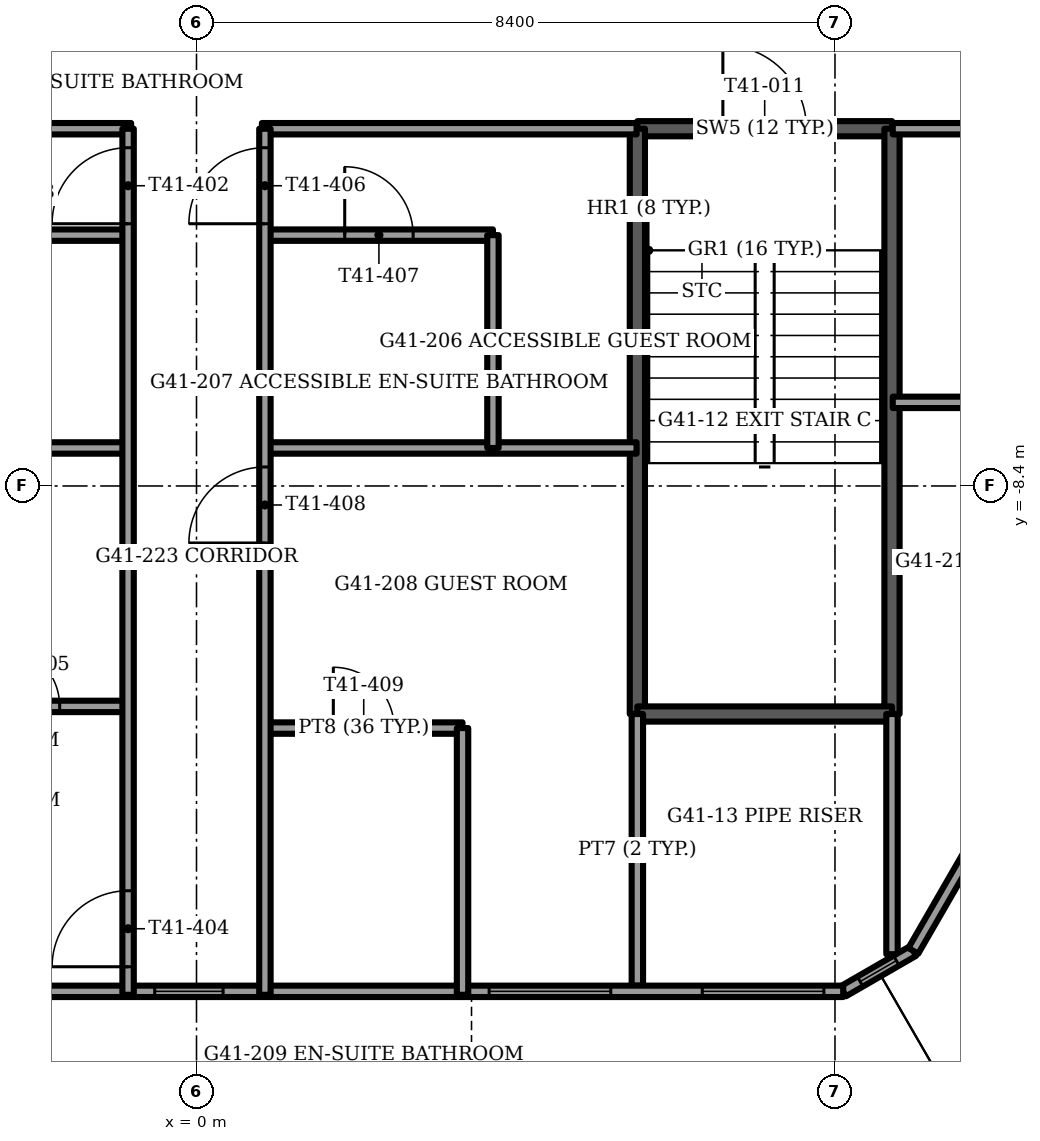
"""IFC4 building model, lengths in metres.
Left out: names, types, materials, properties, quantities, classifications, styles, units other than length and angle.
Written with IfcOpenShell. Run it as: python <this file> out.ifc"""

import sys

from ifc_helpers import new_model, si_unit, direction, frame, frame_2d, origin, place, context, subcontext, project, spatial, rectangle, extrude, element, fill, save


model = new_model("IFC4")
c1 = context("Model", 3, precision=1e-05, world=origin(), true_north=direction((0.0, 1.0)))
c2 = subcontext(c1, "Body", "Model", "MODEL_VIEW")
j1 = project(units=[si_unit("LENGTHUNIT", "METRE"), si_unit("PLANEANGLEUNIT", "RADIAN")], contexts=[c1])
p1 = place(None, origin())
s1 = spatial("IfcSite", under=j1, at=p1, CompositionType="ELEMENT")
p2 = place(p1, origin())
s2 = spatial("IfcBuilding", under=s1, at=p2, CompositionType="ELEMENT")
p3 = place(p2, frame((0.0, 0.0, 168.25)))
s3 = spatial("IfcBuildingStorey", under=s2, at=p3, CompositionType="ELEMENT", Elevation=168.25)
p4 = place(p3, frame((-8.508, -15.049, 0.0), z_axis=(0.0, 0.0, 1.0), x_axis=(1.0, 0.0, 0.0)))
e1 = element("IfcWall", 1, at=p4, inside=s3, PredefinedType="SOLIDWALL", context=c2, shape_type="SweptSolid", body=[
    extrude(rectangle(XDim=17.016, YDim=0.15, at=frame_2d((8.508, 0.0))), origin(), (0.0, 0.0, 1.0), 3.45),
])
p5 = place(p4, frame((3.058, 0.0, 0.15)))
e2 = element("IfcOpeningElement", 2, at=p5, cuts=e1, PredefinedType="OPENING", context=c2, shape_type="SweptSolid", body=[
    extrude(rectangle(XDim=1.6, YDim=2.85, at=frame_2d((0.8, 1.425))), frame((0.0, 0.075, 0.0), z_axis=(0.0, -1.0, 0.0), x_axis=(1.0, 0.0, 0.0)), (0.0, 0.0, 1.0), 0.15),
])
p6 = place(p4, frame((4.708, 0.0, 0.0)))
e3 = element("IfcOpeningElement", 3, at=p6, cuts=e1, PredefinedType="OPENING", context=c2, shape_type="SweptSolid", body=[
    extrude(rectangle(XDim=1.4, YDim=2.4, at=frame_2d((0.7, 1.2))), frame((0.0, 0.075, 0.0), z_axis=(0.0, -1.0, 0.0), x_axis=(1.0, 0.0, 0.0)), (0.0, 0.0, 1.0), 0.15),
])
p7 = place(p4, frame((7.958, 0.0, 0.15)))
e4 = element("IfcOpeningElement", 4, at=p7, cuts=e1, PredefinedType="OPENING", context=c2, shape_type="SweptSolid", body=[
    extrude(rectangle(XDim=0.9, YDim=2.85, at=frame_2d((0.45, 1.425))), frame((0.0, 0.075, 0.0), z_axis=(0.0, -1.0, 0.0), x_axis=(1.0, 0.0, 0.0)), (0.0, 0.0, 1.0), 0.15),
])
p8 = place(p4, frame((12.358, 0.0, 0.15)))
e5 = element("IfcOpeningElement", 5, at=p8, cuts=e1, PredefinedType="OPENING", context=c2, shape_type="SweptSolid", body=[
    extrude(rectangle(XDim=1.6, YDim=2.85, at=frame_2d((0.8, 1.425))), frame((0.0, 0.075, 0.0), z_axis=(0.0, -1.0, 0.0), x_axis=(1.0, 0.0, 0.0)), (0.0, 0.0, 1.0), 0.15),
])
p9 = place(p4, frame((0.254, 0.0, 0.15)))
e6 = element("IfcOpeningElement", 6, at=p9, cuts=e1, PredefinedType="OPENING", context=c2, shape_type="SweptSolid", body=[
    extrude(rectangle(XDim=1.6, YDim=2.73, at=frame_2d((0.8, 1.365))), frame((0.0, 0.075, 0.0), z_axis=(0.0, -1.0, 0.0), x_axis=(1.0, 0.0, 0.0)), (0.0, 0.0, 1.0), 0.15),
])
p10 = place(p4, frame((15.162, 0.0, 0.15)))
e7 = element("IfcOpeningElement", 7, at=p10, cuts=e1, PredefinedType="OPENING", context=c2, shape_type="SweptSolid", body=[
    extrude(rectangle(XDim=1.6, YDim=2.73, at=frame_2d((0.8, 1.365))), frame((0.0, 0.075, 0.0), z_axis=(0.0, -1.0, 0.0), x_axis=(1.0, 0.0, 0.0)), (0.0, 0.0, 1.0), 0.15),
])
p11 = place(p3, frame((9.43, -14.516, 0.0), z_axis=(0.0, 0.0, 1.0), x_axis=(0.500004460396, 0.866022828558, 0.0)))
e8 = element("IfcWall", 8, at=p11, inside=s3, PredefinedType="SOLIDWALL", context=c2, shape_type="SweptSolid", body=[
    extrude(rectangle(XDim=15.712, YDim=0.15, at=frame_2d((7.856, 0.0))), origin(), (0.0, 0.0, 1.0), 3.45),
])
p12 = place(p11, frame((1.856, 0.0, 0.15)))
e9 = element("IfcOpeningElement", 9, at=p12, cuts=e8, PredefinedType="OPENING", context=c2, shape_type="SweptSolid", body=[
    extrude(rectangle(XDim=1.6, YDim=2.85, at=frame_2d((0.8, 1.425))), frame((0.0, 0.075, 0.0), z_axis=(0.0, -1.0, 0.0), x_axis=(1.0, 0.0, 0.0)), (0.0, 0.0, 1.0), 0.15),
])
p13 = place(p11, frame((4.056, 0.0, 0.0)))
e10 = element("IfcOpeningElement", 10, at=p13, cuts=e8, PredefinedType="OPENING", context=c2, shape_type="SweptSolid", body=[
    extrude(rectangle(XDim=1.4, YDim=2.4, at=frame_2d((0.7, 1.2))), frame((0.0, 0.075, 0.0), z_axis=(0.0, -1.0, 0.0), x_axis=(1.0, 0.0, 0.0)), (0.0, 0.0, 1.0), 0.15),
])
p14 = place(p11, frame((6.056, 0.0, 0.15)))
e11 = element("IfcOpeningElement", 11, at=p14, cuts=e8, PredefinedType="OPENING", context=c2, shape_type="SweptSolid", body=[
    extrude(rectangle(XDim=1.6, YDim=2.85, at=frame_2d((0.8, 1.425))), frame((0.0, 0.075, 0.0), z_axis=(0.0, -1.0, 0.0), x_axis=(1.0, 0.0, 0.0)), (0.0, 0.0, 1.0), 0.15),
])
p15 = place(p11, frame((8.256, 0.0, 0.0)))
e12 = element("IfcOpeningElement", 12, at=p15, cuts=e8, PredefinedType="OPENING", context=c2, shape_type="SweptSolid", body=[
    extrude(rectangle(XDim=1.4, YDim=2.4, at=frame_2d((0.7, 1.2))), frame((0.0, 0.075, 0.0), z_axis=(0.0, -1.0, 0.0), x_axis=(1.0, 0.0, 0.0)), (0.0, 0.0, 1.0), 0.15),
])
p16 = place(p11, frame((10.256, 0.0, 0.15)))
e13 = element("IfcOpeningElement", 13, at=p16, cuts=e8, PredefinedType="OPENING", context=c2, shape_type="SweptSolid", body=[
    extrude(rectangle(XDim=1.6, YDim=2.85, at=frame_2d((0.8, 1.425))), frame((0.0, 0.075, 0.0), z_axis=(0.0, -1.0, 0.0), x_axis=(1.0, 0.0, 0.0)), (0.0, 0.0, 1.0), 0.15),
])
p17 = place(p3, frame((8.508, -15.049, 0.0), z_axis=(0.0, 0.0, 1.0), x_axis=(0.866048165231, 0.499960573946, 0.0)))
e14 = element("IfcWall", 14, at=p17, inside=s3, PredefinedType="SOLIDWALL", context=c2, shape_type="SweptSolid", body=[
    extrude(rectangle(XDim=1.065, YDim=0.15, at=frame_2d((0.532, 0.0))), origin(), (0.0, 0.0, 1.0), 3.45),
])
p18 = place(p17, frame((0.258, 0.0, 0.15)))
e15 = element("IfcOpeningElement", 15, at=p18, cuts=e14, PredefinedType="OPENING", context=c2, shape_type="SweptSolid", body=[
    extrude(rectangle(XDim=0.55, YDim=2.85, at=frame_2d((0.275, 1.425))), frame((0.0, 0.075, 0.0), z_axis=(0.0, -1.0, 0.0), x_axis=(1.0, 0.0, 0.0)), (0.0, 0.0, 1.0), 0.15),
])
p19 = place(p3, frame((5.8, -3.7, -0.3), z_axis=(0.0, 0.0, 1.0), x_axis=(1.0, 0.0, 0.0)))
e16 = element("IfcWall", 16, at=p19, inside=s3, PredefinedType="SOLIDWALL", context=c2, shape_type="SweptSolid", body=[
    extrude(rectangle(XDim=3.35, YDim=0.2, at=frame_2d((1.675, 0.0))), origin(), (0.0, 0.0, 1.0), 3.75),
])
p20 = place(p19, frame((1.125, 0.0, 0.0)))
e17 = element("IfcOpeningElement", 17, at=p20, cuts=e16, PredefinedType="OPENING", context=c2, shape_type="SweptSolid", body=[
    extrude(rectangle(XDim=1.1, YDim=2.1, at=frame_2d((0.55, 1.05))), frame((0.0, 0.1, 0.0), z_axis=(0.0, -1.0, 0.0), x_axis=(1.0, 0.0, 0.0)), (0.0, 0.0, 1.0), 0.2),
])
for number, where, z_axis, x_axis in (
    (18, (5.8, -3.7, -0.3), (0.0, 0.0, 1.0), (0.0, -1.0, 0.0)),
    (19, (9.15, -3.7, -0.3), (0.0, 0.0, 1.0), (0.0, -1.0, 0.0)),
):
    element("IfcWall", number, at=place(p3, frame(where, z_axis=z_axis, x_axis=x_axis)), inside=s3, PredefinedType="SOLIDWALL", context=c2, shape_type="SweptSolid", body=[
        extrude(rectangle(XDim=7.7, YDim=0.2, at=frame_2d((3.85, 0.0))), origin(), (0.0, 0.0, 1.0), 3.75),
    ])
p21 = place(p3, frame((5.8, -11.4, -0.3), z_axis=(0.0, 0.0, 1.0), x_axis=(1.0, 0.0, 0.0)))
e20 = element("IfcWall", 20, at=p21, inside=s3, PredefinedType="SOLIDWALL", context=c2, shape_type="SweptSolid", body=[
    extrude(rectangle(XDim=3.35, YDim=0.2, at=frame_2d((1.675, 0.0))), origin(), (0.0, 0.0, 1.0), 3.75),
])
p22 = place(p3, frame((5.8, -11.4, 0.0), z_axis=(0.0, 0.0, 1.0), x_axis=(0.0, -1.0, 0.0)))
e21 = element("IfcWall", 21, at=p22, inside=s3, PredefinedType="PARTITIONING", context=c2, shape_type="SweptSolid", body=[
    extrude(rectangle(XDim=3.574, YDim=0.15, at=frame_2d((1.787, 0.0))), origin(), (0.0, 0.0, 1.0), 3.45),
])
p23 = place(p3, frame((9.15, -11.4, 0.0), z_axis=(0.0, 0.0, 1.0), x_axis=(0.0, -1.0, 0.0)))
e22 = element("IfcWall", 22, at=p23, inside=s3, PredefinedType="PARTITIONING", context=c2, shape_type="SweptSolid", body=[
    extrude(rectangle(XDim=3.16, YDim=0.15, at=frame_2d((1.58, 0.0))), origin(), (0.0, 0.0, 1.0), 3.45),
])
p24 = place(p3, frame((0.9, -11.585, 0.0), z_axis=(0.0, 0.0, 1.0), x_axis=(1.0, 0.0, 0.0)))
e23 = element("IfcWall", 23, at=p24, inside=s3, PredefinedType="PARTITIONING", context=c2, shape_type="SweptSolid", body=[
    extrude(rectangle(XDim=2.6, YDim=0.15, at=frame_2d((1.3, 0.0))), origin(), (0.0, 0.0, 1.0), 3.45),
])
p25 = place(p24, frame((0.9, 0.0, 0.0)))
e24 = element("IfcOpeningElement", 24, at=p25, cuts=e23, PredefinedType="OPENING", context=c2, shape_type="SweptSolid", body=[
    extrude(rectangle(XDim=0.8, YDim=2.1, at=frame_2d((0.4, 1.05))), frame((0.0, 0.075, 0.0), z_axis=(0.0, -1.0, 0.0), x_axis=(1.0, 0.0, 0.0)), (0.0, 0.0, 1.0), 0.15),
])
p26 = place(p3, frame((-3.5, -11.3, 0.0), z_axis=(0.0, 0.0, 1.0), x_axis=(1.0, 0.0, 0.0)))
e25 = element("IfcWall", 25, at=p26, inside=s3, PredefinedType="PARTITIONING", context=c2, shape_type="SweptSolid", body=[
    extrude(rectangle(XDim=2.6, YDim=0.15, at=frame_2d((1.3, 0.0))), origin(), (0.0, 0.0, 1.0), 3.45),
])
p27 = place(p26, frame((0.9, 0.0, 0.0)))
e26 = element("IfcOpeningElement", 26, at=p27, cuts=e25, PredefinedType="OPENING", context=c2, shape_type="SweptSolid", body=[
    extrude(rectangle(XDim=0.8, YDim=2.1, at=frame_2d((0.4, 1.05))), frame((0.0, 0.075, 0.0), z_axis=(0.0, -1.0, 0.0), x_axis=(1.0, 0.0, 0.0)), (0.0, 0.0, 1.0), 0.15),
])
for number, where, z_axis, x_axis in (
    (27, (-5.79, -7.9, 0.0), (0.0, 0.0, 1.0), (1.0, 0.0, 0.0)),
    (28, (0.9, -7.9, 0.0), (0.0, 0.0, 1.0), (1.0, 0.0, 0.0)),
):
    element("IfcWall", number, at=place(p3, frame(where, z_axis=z_axis, x_axis=x_axis)), inside=s3, PredefinedType="PARTITIONING", context=c2, shape_type="SweptSolid", body=[
        extrude(rectangle(XDim=4.89, YDim=0.15, at=frame_2d((2.445, 0.0))), origin(), (0.0, 0.0, 1.0), 3.45),
    ])
p28 = place(p3, frame((9.16, -7.3, 0.0), z_axis=(0.0, 0.0, 1.0), x_axis=(1.0, 0.0, 0.0)))
e29 = element("IfcWall", 29, at=p28, inside=s3, PredefinedType="PARTITIONING", context=c2, shape_type="SweptSolid", body=[
    extrude(rectangle(XDim=3.39, YDim=0.15, at=frame_2d((1.695, 0.0))), origin(), (0.0, 0.0, 1.0), 3.45),
])
p29 = place(p3, frame((-3.9, -5.1, 0.0), z_axis=(0.0, 0.0, 1.0), x_axis=(1.0, 0.0, 0.0)))
e30 = element("IfcWall", 30, at=p29, inside=s3, PredefinedType="PARTITIONING", context=c2, shape_type="SweptSolid", body=[
    extrude(rectangle(XDim=3.0, YDim=0.15, at=frame_2d((1.5, 0.0))), origin(), (0.0, 0.0, 1.0), 3.45),
])
p30 = place(p29, frame((1.05, 0.0, 0.0)))
e31 = element("IfcOpeningElement", 31, at=p30, cuts=e30, PredefinedType="OPENING", context=c2, shape_type="SweptSolid", body=[
    extrude(rectangle(XDim=0.9, YDim=2.1, at=frame_2d((0.45, 1.05))), frame((0.0, 0.075, 0.0), z_axis=(0.0, -1.0, 0.0), x_axis=(1.0, 0.0, 0.0)), (0.0, 0.0, 1.0), 0.15),
])
p31 = place(p3, frame((0.9, -5.1, 0.0), z_axis=(0.0, 0.0, 1.0), x_axis=(1.0, 0.0, 0.0)))
e32 = element("IfcWall", 32, at=p31, inside=s3, PredefinedType="PARTITIONING", context=c2, shape_type="SweptSolid", body=[
    extrude(rectangle(XDim=3.0, YDim=0.15, at=frame_2d((1.5, 0.0))), origin(), (0.0, 0.0, 1.0), 3.45),
])
p32 = place(p31, frame((1.05, 0.0, 0.0)))
e33 = element("IfcOpeningElement", 33, at=p32, cuts=e32, PredefinedType="OPENING", context=c2, shape_type="SweptSolid", body=[
    extrude(rectangle(XDim=0.9, YDim=2.1, at=frame_2d((0.45, 1.05))), frame((0.0, 0.075, 0.0), z_axis=(0.0, -1.0, 0.0), x_axis=(1.0, 0.0, 0.0)), (0.0, 0.0, 1.0), 0.15),
])
for number, where, z_axis, x_axis in (
    (34, (-5.79, -3.7, 0.0), (0.0, 0.0, 1.0), (1.0, 0.0, 0.0)),
    (35, (0.86, -3.7, 0.0), (0.0, 0.0, 1.0), (1.0, 0.0, 0.0)),
):
    element("IfcWall", number, at=place(p3, frame(where, z_axis=z_axis, x_axis=x_axis)), inside=s3, PredefinedType="PARTITIONING", context=c2, shape_type="SweptSolid", body=[
        extrude(rectangle(XDim=4.93, YDim=0.15, at=frame_2d((2.465, 0.0))), origin(), (0.0, 0.0, 1.0), 3.45),
    ])
p33 = place(p3, frame((9.16, -3.7, 0.0), z_axis=(0.0, 0.0, 1.0), x_axis=(1.0, 0.0, 0.0)))
e36 = element("IfcWall", 36, at=p33, inside=s3, PredefinedType="PARTITIONING", context=c2, shape_type="SweptSolid", body=[
    extrude(rectangle(XDim=6.567, YDim=0.15, at=frame_2d((3.284, 0.0))), origin(), (0.0, 0.0, 1.0), 3.45),
])
p34 = place(p33, frame((3.465, 0.0, 0.0)))
e37 = element("IfcOpeningElement", 37, at=p34, cuts=e36, PredefinedType="OPENING", context=c2, shape_type="SweptSolid", body=[
    extrude(rectangle(XDim=1.0, YDim=2.1, at=frame_2d((0.5, 1.05))), frame((0.0, 0.075, 0.0), z_axis=(0.0, -1.0, 0.0), x_axis=(1.0, 0.0, 0.0)), (0.0, 0.0, 1.0), 0.15),
])
p35 = place(p3, frame((3.9, -7.9, 0.0), z_axis=(0.0, 0.0, 1.0), x_axis=(0.0, 1.0, 0.0)))
e38 = element("IfcWall", 38, at=p35, inside=s3, PredefinedType="PARTITIONING", context=c2, shape_type="SweptSolid", body=[
    extrude(rectangle(XDim=2.8, YDim=0.15, at=frame_2d((1.4, 0.0))), origin(), (0.0, 0.0, 1.0), 3.45),
])
p36 = place(p3, frame((3.5, -15.094, 0.0), z_axis=(0.0, 0.0, 1.0), x_axis=(0.0, 1.0, 0.0)))
e39 = element("IfcWall", 39, at=p36, inside=s3, PredefinedType="PARTITIONING", context=c2, shape_type="SweptSolid", body=[
    extrude(rectangle(XDim=3.509, YDim=0.15, at=frame_2d((1.754, 0.0))), origin(), (0.0, 0.0, 1.0), 3.45),
])
p37 = place(p3, frame((0.9, -15.094, 0.0), z_axis=(0.0, 0.0, 1.0), x_axis=(0.0, 1.0, 0.0)))
e40 = element("IfcWall", 40, at=p37, inside=s3, PredefinedType="PARTITIONING", context=c2, shape_type="SweptSolid", body=[
    extrude(rectangle(XDim=11.394, YDim=0.15, at=frame_2d((5.697, 0.0))), origin(), (0.0, 0.0, 1.0), 3.45),
])
p38 = place(p37, frame((10.144, 0.0, 0.0)))
e41 = element("IfcOpeningElement", 41, at=p38, cuts=e40, PredefinedType="OPENING", context=c2, shape_type="SweptSolid", body=[
    extrude(rectangle(XDim=1.0, YDim=2.1, at=frame_2d((0.5, 1.05))), frame((0.0, 0.075, 0.0), z_axis=(0.0, -1.0, 0.0), x_axis=(1.0, 0.0, 0.0)), (0.0, 0.0, 1.0), 0.15),
])
p39 = place(p37, frame((5.944, 0.0, 0.0)))
e42 = element("IfcOpeningElement", 42, at=p39, cuts=e40, PredefinedType="OPENING", context=c2, shape_type="SweptSolid", body=[
    extrude(rectangle(XDim=1.0, YDim=2.1, at=frame_2d((0.5, 1.05))), frame((0.0, 0.075, 0.0), z_axis=(0.0, -1.0, 0.0), x_axis=(1.0, 0.0, 0.0)), (0.0, 0.0, 1.0), 0.15),
])
p40 = place(p3, frame((-0.9, -15.094, 0.0), z_axis=(0.0, 0.0, 1.0), x_axis=(0.0, 1.0, 0.0)))
e43 = element("IfcWall", 43, at=p40, inside=s3, PredefinedType="PARTITIONING", context=c2, shape_type="SweptSolid", body=[
    extrude(rectangle(XDim=11.394, YDim=0.15, at=frame_2d((5.697, 0.0))), origin(), (0.0, 0.0, 1.0), 3.45),
])
p41 = place(p40, frame((10.144, 0.0, 0.0)))
e44 = element("IfcOpeningElement", 44, at=p41, cuts=e43, PredefinedType="OPENING", context=c2, shape_type="SweptSolid", body=[
    extrude(rectangle(XDim=1.0, YDim=2.1, at=frame_2d((0.5, 1.05))), frame((0.0, 0.075, 0.0), z_axis=(0.0, -1.0, 0.0), x_axis=(1.0, 0.0, 0.0)), (0.0, 0.0, 1.0), 0.15),
])
p42 = place(p40, frame((0.369, 0.0, 0.0)))
e45 = element("IfcOpeningElement", 45, at=p42, cuts=e43, PredefinedType="OPENING", context=c2, shape_type="SweptSolid", body=[
    extrude(rectangle(XDim=1.0, YDim=2.1, at=frame_2d((0.5, 1.05))), frame((0.0, 0.075, 0.0), z_axis=(0.0, -1.0, 0.0), x_axis=(1.0, 0.0, 0.0)), (0.0, 0.0, 1.0), 0.15),
])
p43 = place(p7, origin())
e46 = element("IfcWindow", 46, at=p43, inside=s3, PartitioningType="SINGLE_PANEL", PredefinedType="WINDOW", context=c2, shape_type="SweptSolid", body=[
    extrude(rectangle(XDim=0.9, YDim=2.85, at=frame_2d((0.45, 1.425))), frame((0.0, 0.03, 0.0), z_axis=(0.0, -1.0, 0.0), x_axis=(1.0, 0.0, 0.0)), (0.0, 0.0, 1.0), 0.06),
])
fill(e4, e46)
p44 = place(p8, origin())
e47 = element("IfcWindow", 47, at=p44, inside=s3, PartitioningType="SINGLE_PANEL", PredefinedType="WINDOW", context=c2, shape_type="SweptSolid", body=[
    extrude(rectangle(XDim=1.6, YDim=2.85, at=frame_2d((0.8, 1.425))), frame((0.0, 0.03, 0.0), z_axis=(0.0, -1.0, 0.0), x_axis=(1.0, 0.0, 0.0)), (0.0, 0.0, 1.0), 0.06),
])
fill(e5, e47)
p45 = place(p10, origin())
e48 = element("IfcWindow", 48, at=p45, inside=s3, PartitioningType="SINGLE_PANEL", PredefinedType="WINDOW", context=c2, shape_type="SweptSolid", body=[
    extrude(rectangle(XDim=1.6, YDim=2.73, at=frame_2d((0.8, 1.365))), frame((0.0, 0.03, 0.0), z_axis=(0.0, -1.0, 0.0), x_axis=(1.0, 0.0, 0.0)), (0.0, 0.0, 1.0), 0.06),
])
fill(e7, e48)
p46 = place(p18, origin())
e49 = element("IfcWindow", 49, at=p46, inside=s3, PartitioningType="SINGLE_PANEL", PredefinedType="WINDOW", context=c2, shape_type="SweptSolid", body=[
    extrude(rectangle(XDim=0.55, YDim=2.85, at=frame_2d((0.275, 1.425))), frame((0.0, 0.03, 0.0), z_axis=(0.0, -1.0, 0.0), x_axis=(1.0, 0.0, 0.0)), (0.0, 0.0, 1.0), 0.06),
])
fill(e15, e49)
p47 = place(p20, origin())
e50 = element("IfcDoor", 50, at=p47, inside=s3, OperationType="SINGLE_SWING_LEFT", PredefinedType="DOOR", context=c2, shape_type="SweptSolid", body=[
    extrude(rectangle(XDim=1.1, YDim=2.1, at=frame_2d((0.55, 1.05))), frame((0.0, 0.025, 0.0), z_axis=(0.0, -1.0, 0.0), x_axis=(1.0, 0.0, 0.0)), (0.0, 0.0, 1.0), 0.05),
])
fill(e17, e50)
p48 = place(p41, origin())
e51 = element("IfcDoor", 51, at=p48, inside=s3, OperationType="SINGLE_SWING_RIGHT", PredefinedType="DOOR", context=c2, shape_type="SweptSolid", body=[
    extrude(rectangle(XDim=1.0, YDim=2.1, at=frame_2d((0.5, 1.05))), frame((0.0, 0.025, 0.0), z_axis=(0.0, -1.0, 0.0), x_axis=(1.0, 0.0, 0.0)), (0.0, 0.0, 1.0), 0.05),
])
fill(e44, e51)
p49 = place(p42, origin())
e52 = element("IfcDoor", 52, at=p49, inside=s3, OperationType="SINGLE_SWING_LEFT", PredefinedType="DOOR", context=c2, shape_type="SweptSolid", body=[
    extrude(rectangle(XDim=1.0, YDim=2.1, at=frame_2d((0.5, 1.05))), frame((0.0, 0.025, 0.0), z_axis=(0.0, -1.0, 0.0), x_axis=(1.0, 0.0, 0.0)), (0.0, 0.0, 1.0), 0.05),
])
fill(e45, e52)
p50 = place(p27, origin())
e53 = element("IfcDoor", 53, at=p50, inside=s3, OperationType="SINGLE_SWING_RIGHT", PredefinedType="DOOR", context=c2, shape_type="SweptSolid", body=[
    extrude(rectangle(XDim=0.8, YDim=2.1, at=frame_2d((0.4, 1.05))), frame((0.0, 0.025, 0.0), z_axis=(0.0, -1.0, 0.0), x_axis=(1.0, 0.0, 0.0)), (0.0, 0.0, 1.0), 0.05),
])
fill(e26, e53)
p51 = place(p38, origin())
e54 = element("IfcDoor", 54, at=p51, inside=s3, OperationType="SINGLE_SWING_RIGHT", PredefinedType="DOOR", context=c2, shape_type="SweptSolid", body=[
    extrude(rectangle(XDim=1.0, YDim=2.1, at=frame_2d((0.5, 1.05))), frame((0.0, 0.025, 0.0), z_axis=(0.0, -1.0, 0.0), x_axis=(1.0, 0.0, 0.0)), (0.0, 0.0, 1.0), 0.05),
])
fill(e41, e54)
p52 = place(p32, origin())
e55 = element("IfcDoor", 55, at=p52, inside=s3, OperationType="SINGLE_SWING_LEFT", PredefinedType="DOOR", context=c2, shape_type="SweptSolid", body=[
    extrude(rectangle(XDim=0.9, YDim=2.1, at=frame_2d((0.45, 1.05))), frame((0.0, 0.025, 0.0), z_axis=(0.0, -1.0, 0.0), x_axis=(1.0, 0.0, 0.0)), (0.0, 0.0, 1.0), 0.05),
])
fill(e33, e55)
p53 = place(p39, origin())
e56 = element("IfcDoor", 56, at=p53, inside=s3, OperationType="SINGLE_SWING_RIGHT", PredefinedType="DOOR", context=c2, shape_type="SweptSolid", body=[
    extrude(rectangle(XDim=1.0, YDim=2.1, at=frame_2d((0.5, 1.05))), frame((0.0, 0.025, 0.0), z_axis=(0.0, -1.0, 0.0), x_axis=(1.0, 0.0, 0.0)), (0.0, 0.0, 1.0), 0.05),
])
fill(e42, e56)
p54 = place(p25, origin())
e57 = element("IfcDoor", 57, at=p54, inside=s3, OperationType="SINGLE_SWING_LEFT", PredefinedType="DOOR", context=c2, shape_type="SweptSolid", body=[
    extrude(rectangle(XDim=0.8, YDim=2.1, at=frame_2d((0.4, 1.05))), frame((0.0, 0.025, 0.0), z_axis=(0.0, -1.0, 0.0), x_axis=(1.0, 0.0, 0.0)), (0.0, 0.0, 1.0), 0.05),
])
fill(e24, e57)
save(model, sys.argv[1])
